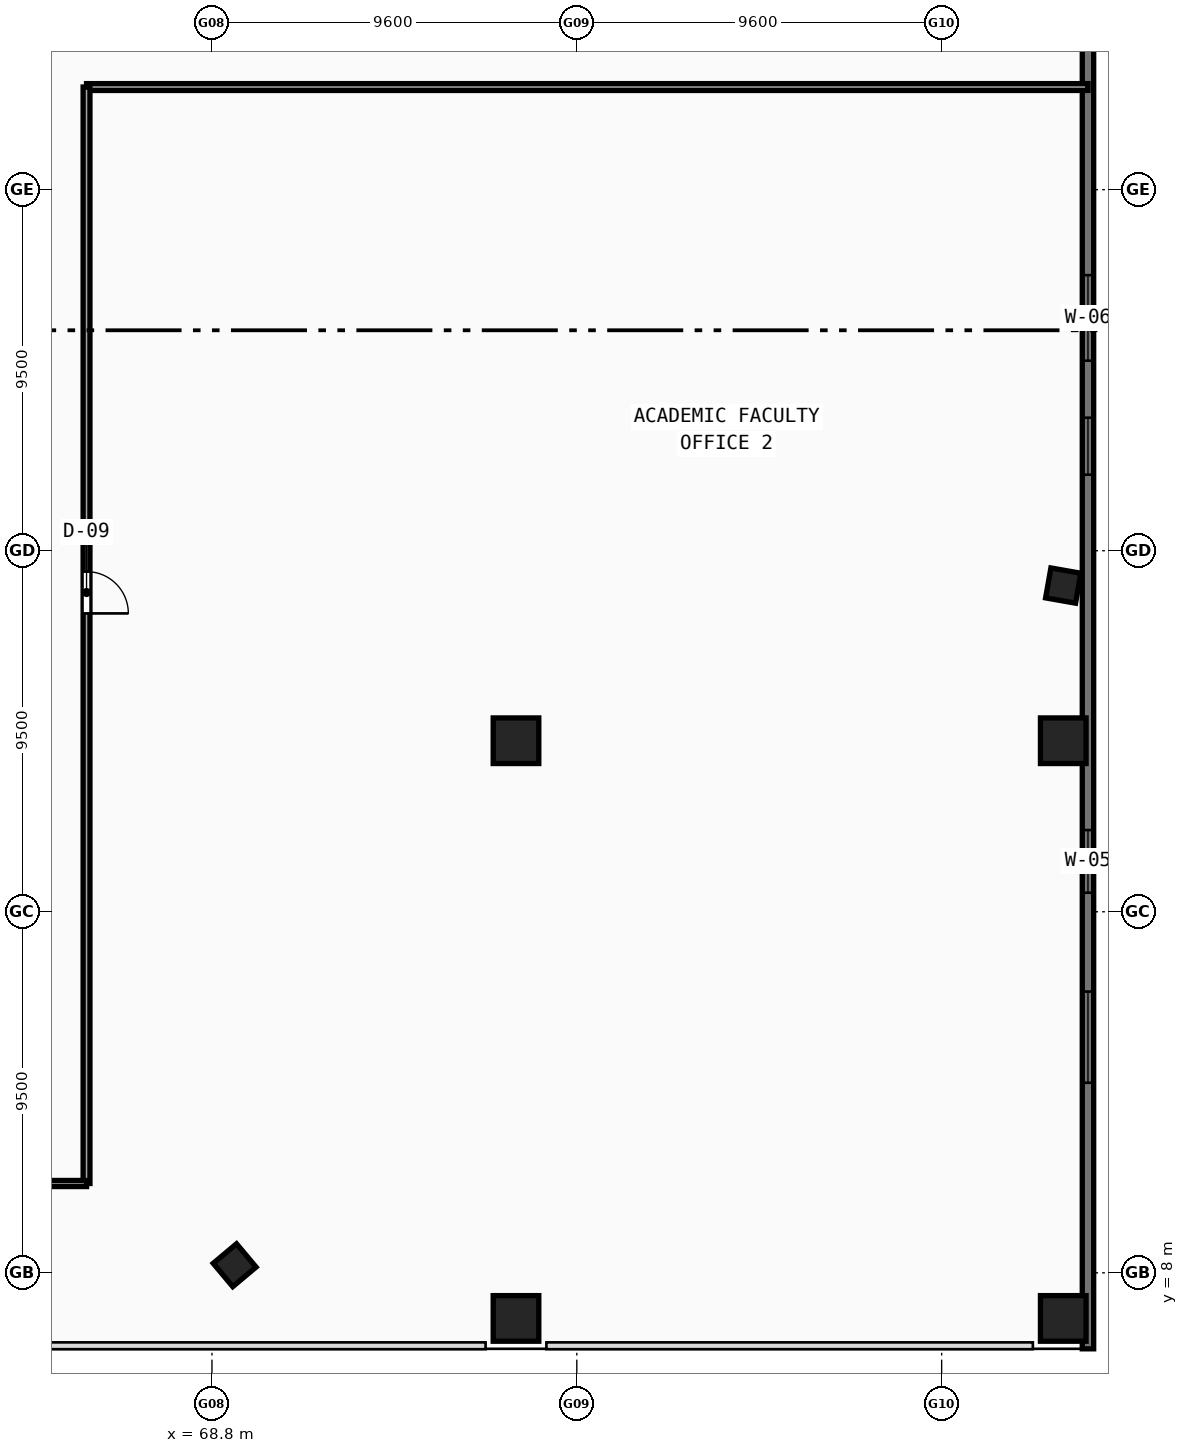
"""IFC4 building model, lengths in metres.
Left out: names, types, materials, properties, quantities, classifications, styles, units other than length and angle.
Written with IfcOpenShell. Run it as: python <this file> out.ifc"""

import sys

from ifc_helpers import new_model, si_unit, direction, frame, frame_2d, origin, origin_with_axes, origin_2d, place, context, subcontext, project, spatial, rectangle, hollow_rectangle, extrude, source, transform, mapped, element, fill, save


model = new_model("IFC4")
c1 = context("Model", 3, precision=1e-05, world=origin(), true_north=direction((0.0, 1.0)))
c2 = subcontext(c1, "Body", "Model", "MODEL_VIEW")
j1 = project(units=[si_unit("LENGTHUNIT", "METRE"), si_unit("PLANEANGLEUNIT", "RADIAN")], contexts=[c1])
p1 = place(None, origin())
s1 = spatial("IfcSite", under=j1, at=p1, CompositionType="ELEMENT")
p2 = place(p1, origin())
s2 = spatial("IfcBuilding", under=s1, at=p2, CompositionType="ELEMENT")
p3 = place(p2, frame((0.0, 0.0, 9.6)))
s3 = spatial("IfcBuildingStorey", under=s2, at=p3, CompositionType="ELEMENT", Elevation=9.6)
m1 = source(origin(), c2, "Body", "SweptSolid", [
    extrude(hollow_rectangle(XDim=1.2, YDim=1.2, WallThickness=0.05, at=origin_2d()), origin(), (0.0, 0.0, 1.0), 4.8),
])
for number, where, z_axis, x_axis in (
    (1, (76.8, 6.8, -0.28), (0.0, 0.0, 1.0), (1.0, 0.0, 0.0)),
    (2, (76.8, 22.0, -0.28), (0.0, 0.0, 1.0), (1.0, 0.0, 0.0)),
    (3, (91.2, 6.8, -0.28), (0.0, 0.0, 1.0), (1.0, 0.0, 0.0)),
    (4, (91.2, 22.0, -0.28), (0.0, 0.0, 1.0), (1.0, 0.0, 0.0)),
):
    element("IfcColumn", number, at=place(p3, frame(where, z_axis=z_axis, x_axis=x_axis)), inside=s3, PredefinedType="COLUMN", context=c2, shape_type="MappedRepresentation", body=[
        mapped(m1, transform((0.0, 0.0, 0.0), scale=1.0)),
    ])
m2 = source(origin(), c2, "Body", "SweptSolid", [
    extrude(hollow_rectangle(XDim=0.8, YDim=0.8, WallThickness=0.032, at=origin_2d()), origin(), (0.0, 0.0, 1.0), 4.8),
])
for number, where, z_axis, x_axis in (
    (5, (69.397, 8.2, -0.28), (0.0, 0.0, 1.0), (0.766, 0.643, 0.0)),
    (6, (91.199, 26.083, -0.28), (0.0, 0.0, 1.0), (0.174, 0.985, 0.0)),
):
    element("IfcColumn", number, at=place(p3, frame(where, z_axis=z_axis, x_axis=x_axis)), inside=s3, PredefinedType="COLUMN", context=c2, shape_type="MappedRepresentation", body=[
        mapped(m2, transform((0.0, 0.0, 0.0), scale=1.0)),
    ])
p4 = place(p3, frame((91.85, 6.0, 0.0), z_axis=(0.0, 0.0, 1.0), x_axis=(0.0, 1.0, 0.0)))
e7 = element("IfcWall", 7, at=p4, inside=s3, PredefinedType="STANDARD", context=c2, shape_type="SweptSolid", body=[
    extrude(rectangle(XDim=76.0, YDim=0.3, at=frame_2d((38.0, 0.0))), origin(), (0.0, 0.0, 1.0), 4.52),
])
p5 = place(p4, frame((7.0, 0.0, 0.9)))
e8 = element("IfcOpeningElement", 8, at=p5, cuts=e7, PredefinedType="OPENING", context=c2, shape_type="SweptSolid", body=[
    extrude(rectangle(XDim=2.4, YDim=1.8, at=frame_2d((1.2, 0.9))), frame((0.0, 0.16, 0.0), z_axis=(0.0, -1.0, 0.0), x_axis=(1.0, 0.0, 0.0)), (0.0, 0.0, 1.0), 0.32),
])
p6 = place(p4, frame((23.0, 0.0, 0.9)))
e9 = element("IfcOpeningElement", 9, at=p6, cuts=e7, PredefinedType="OPENING", context=c2, shape_type="SweptSolid", body=[
    extrude(rectangle(XDim=1.5, YDim=1.6, at=frame_2d((0.75, 0.8))), frame((0.0, 0.16, 0.0), z_axis=(0.0, -1.0, 0.0), x_axis=(1.0, 0.0, 0.0)), (0.0, 0.0, 1.0), 0.32),
])
p7 = place(p4, frame((43.0, 0.0, 0.9)))
e10 = element("IfcOpeningElement", 10, at=p7, cuts=e7, PredefinedType="OPENING", context=c2, shape_type="SweptSolid", body=[
    extrude(rectangle(XDim=2.4, YDim=1.8, at=frame_2d((1.2, 0.9))), frame((0.0, 0.16, 0.0), z_axis=(0.0, -1.0, 0.0), x_axis=(1.0, 0.0, 0.0)), (0.0, 0.0, 1.0), 0.32),
])
p8 = place(p4, frame((63.0, 0.0, 0.9)))
e11 = element("IfcOpeningElement", 11, at=p8, cuts=e7, PredefinedType="OPENING", context=c2, shape_type="SweptSolid", body=[
    extrude(rectangle(XDim=1.5, YDim=1.6, at=frame_2d((0.75, 0.8))), frame((0.0, 0.16, 0.0), z_axis=(0.0, -1.0, 0.0), x_axis=(1.0, 0.0, 0.0)), (0.0, 0.0, 1.0), 0.32),
])
p9 = place(p4, frame((12.0, 0.0, 0.95)))
e12 = element("IfcOpeningElement", 12, at=p9, cuts=e7, PredefinedType="OPENING", context=c2, shape_type="SweptSolid", body=[
    extrude(rectangle(XDim=1.65, YDim=1.65, at=frame_2d((0.825, 0.825))), frame((0.0, 0.16, 0.0), z_axis=(0.0, -1.0, 0.0), x_axis=(1.0, 0.0, 0.0)), (0.0, 0.0, 1.0), 0.32),
])
p10 = place(p4, frame((26.0, 0.0, 0.95)))
e13 = element("IfcOpeningElement", 13, at=p10, cuts=e7, PredefinedType="OPENING", context=c2, shape_type="SweptSolid", body=[
    extrude(rectangle(XDim=2.25, YDim=1.8, at=frame_2d((1.125, 0.9))), frame((0.0, 0.16, 0.0), z_axis=(0.0, -1.0, 0.0), x_axis=(1.0, 0.0, 0.0)), (0.0, 0.0, 1.0), 0.32),
])
p11 = place(p3, frame((65.5, 39.2, 0.0), z_axis=(0.0, 0.0, 1.0), x_axis=(1.0, 0.0, 0.0)))
e14 = element("IfcWall", 14, at=p11, inside=s3, PredefinedType="PARTITIONING", context=c2, shape_type="SweptSolid", body=[
    extrude(rectangle(XDim=26.35, YDim=0.18, at=frame_2d((13.175, 0.0))), origin(), (0.0, 0.0, 1.0), 3.62),
])
p12 = place(p3, frame((65.5, 10.35, 0.0), z_axis=(0.0, 0.0, 1.0), x_axis=(0.0, 1.0, 0.0)))
e15 = element("IfcWall", 15, at=p12, inside=s3, PredefinedType="PARTITIONING", context=c2, shape_type="SweptSolid", body=[
    extrude(rectangle(XDim=28.85, YDim=0.18, at=frame_2d((14.425, 0.0))), origin(), (0.0, 0.0, 1.0), 3.62),
])
p13 = place(p12, frame((15.0, 0.0, 0.0)))
e16 = element("IfcOpeningElement", 16, at=p13, cuts=e15, PredefinedType="OPENING", context=c2, shape_type="SweptSolid", body=[
    extrude(rectangle(XDim=1.1, YDim=2.15, at=frame_2d((0.55, 1.075))), frame((0.0, 0.1, 0.0), z_axis=(0.0, -1.0, 0.0), x_axis=(1.0, 0.0, 0.0)), (0.0, 0.0, 1.0), 0.2),
])
p14 = place(p3, frame((30.5, 10.35, 0.0), z_axis=(0.0, 0.0, 1.0), x_axis=(1.0, 0.0, 0.0)))
e17 = element("IfcWall", 17, at=p14, inside=s3, PredefinedType="PARTITIONING", context=c2, shape_type="SweptSolid", body=[
    extrude(rectangle(XDim=35.0, YDim=0.16, at=frame_2d((17.5, 0.0))), origin(), (0.0, 0.0, 1.0), 3.62),
])
m3 = source(origin(), c2, "Body", "SweptSolid", [
    extrude(rectangle(XDim=2.4, YDim=1.8, at=frame_2d((1.2, 0.9))), frame((0.0, 0.03, 0.0), z_axis=(0.0, -1.0, 0.0), x_axis=(1.0, 0.0, 0.0)), (0.0, 0.0, 1.0), 0.06),
])
p15 = place(p5, origin_with_axes())
e18 = element("IfcWindow", 18, at=p15, inside=s3, PartitioningType="SINGLE_PANEL", PredefinedType="WINDOW", context=c2, shape_type="MappedRepresentation", body=[
    mapped(m3, transform((0.0, 0.0, 0.0), scale=1.0)),
])
fill(e8, e18)
m4 = source(origin(), c2, "Body", "SweptSolid", [
    extrude(rectangle(XDim=1.5, YDim=1.6, at=frame_2d((0.75, 0.8))), frame((0.0, 0.03, 0.0), z_axis=(0.0, -1.0, 0.0), x_axis=(1.0, 0.0, 0.0)), (0.0, 0.0, 1.0), 0.06),
])
p16 = place(p6, origin_with_axes())
e19 = element("IfcWindow", 19, at=p16, inside=s3, PartitioningType="SINGLE_PANEL", PredefinedType="WINDOW", context=c2, shape_type="MappedRepresentation", body=[
    mapped(m4, transform((0.0, 0.0, 0.0), scale=1.0)),
])
fill(e9, e19)
m5 = source(origin(), c2, "Body", "SweptSolid", [
    extrude(rectangle(XDim=1.1, YDim=2.15, at=frame_2d((0.55, 1.075))), frame((0.0, 0.025, 0.0), z_axis=(0.0, -1.0, 0.0), x_axis=(1.0, 0.0, 0.0)), (0.0, 0.0, 1.0), 0.05),
])
p17 = place(p13, frame((1.1, 0.0, 0.0), z_axis=(0.0, 0.0, 1.0), x_axis=(-1.0, 0.0, 0.0)))
e20 = element("IfcDoor", 20, at=p17, inside=s3, OperationType="SINGLE_SWING_RIGHT", PredefinedType="DOOR", context=c2, shape_type="MappedRepresentation", body=[
    mapped(m5, transform((0.0, 0.0, 0.0), scale=1.0)),
])
fill(e16, e20)
m6 = source(origin(), c2, "Body", "SweptSolid", [
    extrude(rectangle(XDim=1.65, YDim=1.65, at=frame_2d((0.825, 0.825))), frame((0.0, 0.03, 0.0), z_axis=(0.0, -1.0, 0.0), x_axis=(1.0, 0.0, 0.0)), (0.0, 0.0, 1.0), 0.06),
])
p18 = place(p9, origin_with_axes())
e21 = element("IfcWindow", 21, at=p18, inside=s3, PartitioningType="SINGLE_PANEL", PredefinedType="WINDOW", context=c2, shape_type="MappedRepresentation", body=[
    mapped(m6, transform((0.0, 0.0, 0.0), scale=1.0)),
])
fill(e12, e21)
m7 = source(origin(), c2, "Body", "SweptSolid", [
    extrude(rectangle(XDim=2.25, YDim=1.8, at=frame_2d((1.125, 0.9))), frame((0.0, 0.03, 0.0), z_axis=(0.0, -1.0, 0.0), x_axis=(1.0, 0.0, 0.0)), (0.0, 0.0, 1.0), 0.06),
])
p19 = place(p10, origin_with_axes())
e22 = element("IfcWindow", 22, at=p19, inside=s3, PartitioningType="SINGLE_PANEL", PredefinedType="WINDOW", context=c2, shape_type="MappedRepresentation", body=[
    mapped(m7, transform((0.0, 0.0, 0.0), scale=1.0)),
])
fill(e13, e22)
save(model, sys.argv[1])
